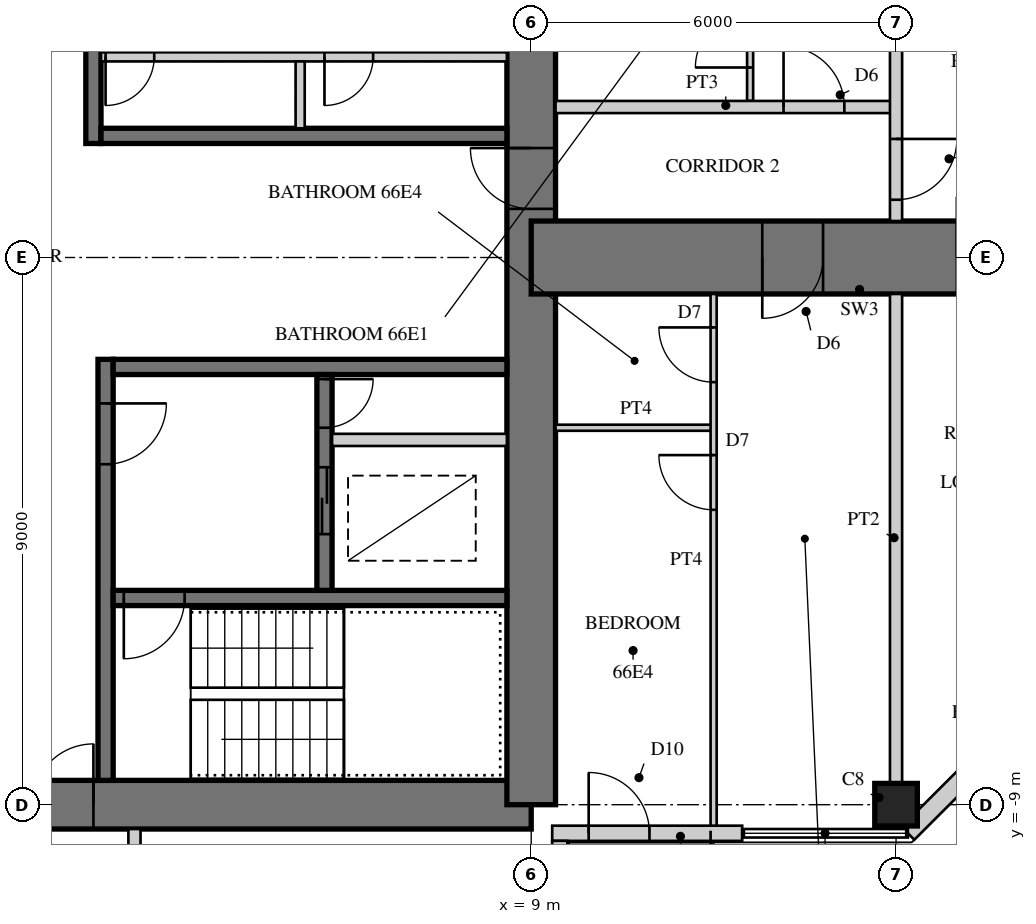
"""IFC4 building model, lengths in metres.
Left out: names, types, materials, properties, quantities, classifications, styles, units other than length and angle.
Written with IfcOpenShell. Run it as: python <this file> out.ifc"""

import sys

from ifc_helpers import new_model, si_unit, direction, frame, frame_2d, origin, origin_2d, place, context, subcontext, project, spatial, rectangle, hollow_rectangle, extrude, element, fill, save


model = new_model("IFC4")
c1 = context("Model", 3, precision=1e-05, world=origin(), true_north=direction((0.0, 1.0)))
c2 = subcontext(c1, "Body", "Model", "MODEL_VIEW")
j1 = project(units=[si_unit("LENGTHUNIT", "METRE"), si_unit("PLANEANGLEUNIT", "RADIAN")], contexts=[c1])
p1 = place(None, origin())
s1 = spatial("IfcSite", under=j1, at=p1, CompositionType="ELEMENT")
p2 = place(p1, origin())
s2 = spatial("IfcBuilding", under=s1, at=p2, CompositionType="ELEMENT")
p3 = place(p2, frame((0.0, 0.0, 257.7)))
s3 = spatial("IfcBuildingStorey", under=s2, at=p3, CompositionType="ELEMENT", Elevation=257.7)
p4 = place(p3, frame((-9.0, -9.0, 0.0), z_axis=(0.0, 0.0, 1.0), x_axis=(1.0, 0.0, 0.0)))
e1 = element("IfcWall", 1, at=p4, inside=s3, PredefinedType="SHEAR", context=c2, shape_type="SweptSolid", body=[
    extrude(rectangle(XDim=18.0, YDim=0.8, at=frame_2d((9.0, 0.0))), origin(), (0.0, 0.0, 1.0), 3.4),
])
p5 = place(p4, frame((9.8, 0.0, 0.0)))
e2 = element("IfcOpeningElement", 2, at=p5, cuts=e1, PredefinedType="OPENING", context=c2, shape_type="SweptSolid", body=[
    extrude(rectangle(XDim=1.0, YDim=2.4, at=frame_2d((0.5, 1.2))), frame((0.0, 0.41, 0.0), z_axis=(0.0, -1.0, 0.0), x_axis=(1.0, 0.0, 0.0)), (0.0, 0.0, 1.0), 0.82),
])
p6 = place(p3, frame((9.0, -9.0, 0.0), z_axis=(0.0, 0.0, 1.0), x_axis=(0.0, 1.0, 0.0)))
e3 = element("IfcWall", 3, at=p6, inside=s3, PredefinedType="SHEAR", context=c2, shape_type="SweptSolid", body=[
    extrude(rectangle(XDim=18.0, YDim=0.8, at=frame_2d((9.0, 0.0))), origin(), (0.0, 0.0, 1.0), 3.4),
])
p7 = place(p6, frame((9.8, 0.0, 0.0)))
e4 = element("IfcOpeningElement", 4, at=p7, cuts=e3, PredefinedType="OPENING", context=c2, shape_type="SweptSolid", body=[
    extrude(rectangle(XDim=1.0, YDim=2.4, at=frame_2d((0.5, 1.2))), frame((0.0, 0.41, 0.0), z_axis=(0.0, -1.0, 0.0), x_axis=(1.0, 0.0, 0.0)), (0.0, 0.0, 1.0), 0.82),
])
p8 = place(p3, frame((1.8, 1.875, 0.0), z_axis=(0.0, 0.0, 1.0), x_axis=(0.0, 1.0, 0.0)))
e5 = element("IfcWall", 5, at=p8, inside=s3, PredefinedType="SHEAR", context=c2, shape_type="SweptSolid", body=[
    extrude(rectangle(XDim=6.725, YDim=0.25, at=frame_2d((3.363, 0.0))), origin(), (0.0, 0.0, 1.0), 3.4),
])
p9 = place(p8, frame((1.875, 0.0, 0.0)))
e6 = element("IfcOpeningElement", 6, at=p9, cuts=e5, PredefinedType="OPENING", context=c2, shape_type="SweptSolid", body=[
    extrude(rectangle(XDim=1.6, YDim=2.4, at=frame_2d((0.8, 1.2))), frame((0.0, 0.135, 0.0), z_axis=(0.0, -1.0, 0.0), x_axis=(1.0, 0.0, 0.0)), (0.0, 0.0, 1.0), 0.27),
])
p10 = place(p3, frame((1.925, 2.0, 0.0), z_axis=(0.0, 0.0, 1.0), x_axis=(1.0, 0.0, 0.0)))
e7 = element("IfcWall", 7, at=p10, inside=s3, PredefinedType="SHEAR", context=c2, shape_type="SweptSolid", body=[
    extrude(rectangle(XDim=6.675, YDim=0.25, at=frame_2d((3.337, 0.0))), origin(), (0.0, 0.0, 1.0), 3.4),
])
p11 = place(p3, frame((1.925, 3.3, 0.0), z_axis=(0.0, 0.0, 1.0), x_axis=(1.0, 0.0, 0.0)))
e8 = element("IfcWall", 8, at=p11, inside=s3, PredefinedType="PARTITIONING", context=c2, shape_type="SweptSolid", body=[
    extrude(rectangle(XDim=6.675, YDim=0.15, at=frame_2d((3.337, 0.0))), origin(), (0.0, 0.0, 1.0), 3.4),
])
p12 = place(p11, frame((0.075, 0.0, 0.0)))
e9 = element("IfcOpeningElement", 9, at=p12, cuts=e8, PredefinedType="OPENING", context=c2, shape_type="SweptSolid", body=[
    extrude(rectangle(XDim=0.8, YDim=2.1, at=frame_2d((0.4, 1.05))), frame((0.0, 0.085, 0.0), z_axis=(0.0, -1.0, 0.0), x_axis=(1.0, 0.0, 0.0)), (0.0, 0.0, 1.0), 0.17),
])
p13 = place(p11, frame((3.675, 0.0, 0.0)))
e10 = element("IfcOpeningElement", 10, at=p13, cuts=e8, PredefinedType="OPENING", context=c2, shape_type="SweptSolid", body=[
    extrude(rectangle(XDim=0.8, YDim=2.1, at=frame_2d((0.4, 1.05))), frame((0.0, 0.085, 0.0), z_axis=(0.0, -1.0, 0.0), x_axis=(1.0, 0.0, 0.0)), (0.0, 0.0, 1.0), 0.17),
])
p14 = place(p3, frame((5.2, 2.125, 0.0), z_axis=(0.0, 0.0, 1.0), x_axis=(0.0, 1.0, 0.0)))
e11 = element("IfcWall", 11, at=p14, inside=s3, PredefinedType="PARTITIONING", context=c2, shape_type="SweptSolid", body=[
    extrude(rectangle(XDim=1.1, YDim=0.15, at=frame_2d((0.55, 0.0))), origin(), (0.0, 0.0, 1.0), 3.4),
])
p15 = place(p3, frame((2.0, -1.675, 0.0), z_axis=(0.0, 0.0, 1.0), x_axis=(0.0, -1.0, 0.0)))
e12 = element("IfcWall", 12, at=p15, inside=s3, PredefinedType="SHEAR", context=c2, shape_type="SweptSolid", body=[
    extrude(rectangle(XDim=6.925, YDim=0.25, at=frame_2d((3.462, 0.0))), origin(), (0.0, 0.0, 1.0), 3.4),
])
p16 = place(p15, frame((0.725, 0.0, 0.0)))
e13 = element("IfcOpeningElement", 13, at=p16, cuts=e12, PredefinedType="OPENING", context=c2, shape_type="SweptSolid", body=[
    extrude(rectangle(XDim=1.0, YDim=2.1, at=frame_2d((0.5, 1.05))), frame((0.0, 0.135, 0.0), z_axis=(0.0, -1.0, 0.0), x_axis=(1.0, 0.0, 0.0)), (0.0, 0.0, 1.0), 0.27),
])
p17 = place(p3, frame((2.125, -1.8, 0.0), z_axis=(0.0, 0.0, 1.0), x_axis=(1.0, 0.0, 0.0)))
e14 = element("IfcWall", 14, at=p17, inside=s3, PredefinedType="SHEAR", context=c2, shape_type="SweptSolid", body=[
    extrude(rectangle(XDim=6.475, YDim=0.25, at=frame_2d((3.238, 0.0))), origin(), (0.0, 0.0, 1.0), 3.4),
])
p18 = place(p3, frame((2.125, -5.6, 0.0), z_axis=(0.0, 0.0, 1.0), x_axis=(1.0, 0.0, 0.0)))
e15 = element("IfcWall", 15, at=p18, inside=s3, PredefinedType="SHEAR", context=c2, shape_type="SweptSolid", body=[
    extrude(rectangle(XDim=6.475, YDim=0.25, at=frame_2d((3.238, 0.0))), origin(), (0.0, 0.0, 1.0), 3.4),
])
p19 = place(p18, frame((0.175, 0.0, 0.0)))
e16 = element("IfcOpeningElement", 16, at=p19, cuts=e15, PredefinedType="OPENING", context=c2, shape_type="SweptSolid", body=[
    extrude(rectangle(XDim=1.0, YDim=2.1, at=frame_2d((0.5, 1.05))), frame((0.0, 0.135, 0.0), z_axis=(0.0, -1.0, 0.0), x_axis=(1.0, 0.0, 0.0)), (0.0, 0.0, 1.0), 0.27),
])
p20 = place(p3, frame((5.6, -1.925, 0.0), z_axis=(0.0, 0.0, 1.0), x_axis=(0.0, -1.0, 0.0)))
e17 = element("IfcWall", 17, at=p20, inside=s3, PredefinedType="SHEAR", context=c2, shape_type="SweptSolid", body=[
    extrude(rectangle(XDim=3.55, YDim=0.25, at=frame_2d((1.775, 0.0))), origin(), (0.0, 0.0, 1.0), 3.4),
])
p21 = place(p20, frame((1.525, 0.0, 0.0)))
e18 = element("IfcOpeningElement", 18, at=p21, cuts=e17, PredefinedType="OPENING", context=c2, shape_type="SweptSolid", body=[
    extrude(rectangle(XDim=1.1, YDim=2.2, at=frame_2d((0.55, 1.1))), frame((0.0, 0.135, 0.0), z_axis=(0.0, -1.0, 0.0), x_axis=(1.0, 0.0, 0.0)), (0.0, 0.0, 1.0), 0.27),
])
p22 = place(p20, frame((0.075, 0.0, 0.0)))
e19 = element("IfcOpeningElement", 19, at=p22, cuts=e17, PredefinedType="OPENING", context=c2, shape_type="SweptSolid", body=[
    extrude(rectangle(XDim=0.8, YDim=2.1, at=frame_2d((0.4, 1.05))), frame((0.0, 0.135, 0.0), z_axis=(0.0, -1.0, 0.0), x_axis=(1.0, 0.0, 0.0)), (0.0, 0.0, 1.0), 0.27),
])
p23 = place(p3, frame((5.725, -3.0, 0.0), z_axis=(0.0, 0.0, 1.0), x_axis=(1.0, 0.0, 0.0)))
e20 = element("IfcWall", 20, at=p23, inside=s3, PredefinedType="PARTITIONING", context=c2, shape_type="SweptSolid", body=[
    extrude(rectangle(XDim=2.875, YDim=0.2, at=frame_2d((1.438, 0.0))), origin(), (0.0, 0.0, 1.0), 3.4),
])
p24 = place(p3, frame((9.0, 0.0, 0.0), z_axis=(0.0, 0.0, 1.0), x_axis=(1.0, 0.0, 0.0)))
e21 = element("IfcWall", 21, at=p24, inside=s3, PredefinedType="SHEAR", context=c2, shape_type="SweptSolid", body=[
    extrude(rectangle(XDim=9.0, YDim=1.2, at=frame_2d((4.5, 0.0))), origin(), (0.0, 0.0, 1.0), 3.4),
])
p25 = place(p24, frame((3.8, 0.0, 0.0)))
e22 = element("IfcOpeningElement", 22, at=p25, cuts=e21, PredefinedType="OPENING", context=c2, shape_type="SweptSolid", body=[
    extrude(rectangle(XDim=1.0, YDim=2.15, at=frame_2d((0.5, 1.075))), frame((0.0, 0.61, 0.0), z_axis=(0.0, -1.0, 0.0), x_axis=(1.0, 0.0, 0.0)), (0.0, 0.0, 1.0), 1.22),
])
p26 = place(p24, frame((7.0, 0.0, 0.0)))
e23 = element("IfcOpeningElement", 23, at=p26, cuts=e21, PredefinedType="OPENING", context=c2, shape_type="SweptSolid", body=[
    extrude(rectangle(XDim=1.0, YDim=2.2, at=frame_2d((0.5, 1.1))), frame((0.0, 0.61, 0.0), z_axis=(0.0, -1.0, 0.0), x_axis=(1.0, 0.0, 0.0)), (0.0, 0.0, 1.0), 1.22),
])
p27 = place(p3, frame((15.0, -9.0, 0.0), z_axis=(0.0, 0.0, 1.0), x_axis=(1.0, 0.0, 0.0)))
e24 = element("IfcColumn", 24, at=p27, inside=s3, PredefinedType="COLUMN", context=c2, shape_type="SweptSolid", body=[
    extrude(rectangle(XDim=0.7, YDim=0.7, at=origin_2d()), origin(), (0.0, 0.0, 1.0), 3.4),
])
p28 = place(p3, frame((9.345, -9.47, 0.0), z_axis=(0.0, 0.0, 1.0), x_axis=(1.0, 0.0, 0.0)))
e25 = element("IfcWall", 25, at=p28, inside=s3, PredefinedType="SOLIDWALL", context=c2, shape_type="SweptSolid", body=[
    extrude(rectangle(XDim=3.125, YDim=0.25, at=frame_2d((1.562, 0.0))), origin(), (0.0, 0.0, 1.0), 3.22),
])
p29 = place(p28, frame((0.6, 0.0, 0.0)))
e26 = element("IfcOpeningElement", 26, at=p29, cuts=e25, PredefinedType="OPENING", context=c2, shape_type="SweptSolid", body=[
    extrude(rectangle(XDim=1.0, YDim=2.2, at=frame_2d((0.5, 1.1))), frame((0.0, 0.135, 0.0), z_axis=(0.0, -1.0, 0.0), x_axis=(1.0, 0.0, 0.0)), (0.0, 0.0, 1.0), 0.27),
])
p30 = place(p3, frame((15.195, -9.47, 0.0), z_axis=(0.0, 0.0, 1.0), x_axis=(0.707106781187, 0.707106781187, 0.0)))
e27 = element("IfcWall", 27, at=p30, inside=s3, PredefinedType="SOLIDWALL", context=c2, shape_type="SweptSolid", body=[
    extrude(rectangle(XDim=4.632, YDim=0.3, at=frame_2d((2.316, 0.0))), origin(), (0.0, 0.0, 1.0), 3.22),
])
p31 = place(p30, frame((1.866, 0.0, 0.3)))
e28 = element("IfcOpeningElement", 28, at=p31, cuts=e27, PredefinedType="OPENING", context=c2, shape_type="SweptSolid", body=[
    extrude(rectangle(XDim=0.9, YDim=2.4, at=frame_2d((0.45, 1.2))), frame((0.0, 0.16, 0.0), z_axis=(0.0, -1.0, 0.0), x_axis=(1.0, 0.0, 0.0)), (0.0, 0.0, 1.0), 0.32),
])
p32 = place(p3, frame((9.47, -12.47, 0.0), z_axis=(0.0, 0.0, 1.0), x_axis=(0.0, 1.0, 0.0)))
e29 = element("IfcWall", 29, at=p32, inside=s3, PredefinedType="SOLIDWALL", context=c2, shape_type="SweptSolid", body=[
    extrude(rectangle(XDim=2.875, YDim=0.25, at=frame_2d((1.438, 0.0))), origin(), (0.0, 0.0, 1.0), 3.22),
])
p33 = place(p32, frame((0.6, 0.0, 0.0)))
e30 = element("IfcOpeningElement", 30, at=p33, cuts=e29, PredefinedType="OPENING", context=c2, shape_type="SweptSolid", body=[
    extrude(rectangle(XDim=1.0, YDim=2.2, at=frame_2d((0.5, 1.1))), frame((0.0, 0.135, 0.0), z_axis=(0.0, -1.0, 0.0), x_axis=(1.0, 0.0, 0.0)), (0.0, 0.0, 1.0), 0.27),
])
p34 = place(p3, frame((12.6, 2.575, 0.0), z_axis=(0.0, 0.0, 1.0), x_axis=(0.0, 1.0, 0.0)))
e31 = element("IfcWall", 31, at=p34, inside=s3, PredefinedType="PARTITIONING", context=c2, shape_type="SweptSolid", body=[
    extrude(rectangle(XDim=6.855, YDim=0.1, at=frame_2d((3.427, 0.0))), origin(), (0.0, 0.0, 1.0), 3.22),
])
p35 = place(p34, frame((0.55, 0.0, 0.0)))
e32 = element("IfcOpeningElement", 32, at=p35, cuts=e31, PredefinedType="OPENING", context=c2, shape_type="SweptSolid", body=[
    extrude(rectangle(XDim=0.9, YDim=2.1, at=frame_2d((0.45, 1.05))), frame((0.0, 0.06, 0.0), z_axis=(0.0, -1.0, 0.0), x_axis=(1.0, 0.0, 0.0)), (0.0, 0.0, 1.0), 0.12),
])
p36 = place(p34, frame((2.65, 0.0, 0.0)))
e33 = element("IfcOpeningElement", 33, at=p36, cuts=e31, PredefinedType="OPENING", context=c2, shape_type="SweptSolid", body=[
    extrude(rectangle(XDim=0.9, YDim=2.1, at=frame_2d((0.45, 1.05))), frame((0.0, 0.06, 0.0), z_axis=(0.0, -1.0, 0.0), x_axis=(1.0, 0.0, 0.0)), (0.0, 0.0, 1.0), 0.12),
])
p37 = place(p3, frame((9.4, -2.8, 0.0), z_axis=(0.0, 0.0, 1.0), x_axis=(1.0, 0.0, 0.0)))
e34 = element("IfcWall", 34, at=p37, inside=s3, PredefinedType="PARTITIONING", context=c2, shape_type="SweptSolid", body=[
    extrude(rectangle(XDim=2.65, YDim=0.1, at=frame_2d((1.325, 0.0))), origin(), (0.0, 0.0, 1.0), 3.22),
])
p38 = place(p3, frame((12.0, -9.345, 0.0), z_axis=(0.0, 0.0, 1.0), x_axis=(0.0, 1.0, 0.0)))
e35 = element("IfcWall", 35, at=p38, inside=s3, PredefinedType="PARTITIONING", context=c2, shape_type="SweptSolid", body=[
    extrude(rectangle(XDim=8.745, YDim=0.1, at=frame_2d((4.373, 0.0))), origin(), (0.0, 0.0, 1.0), 3.22),
])
p39 = place(p38, frame((5.195, 0.0, 0.0)))
e36 = element("IfcOpeningElement", 36, at=p39, cuts=e35, PredefinedType="OPENING", context=c2, shape_type="SweptSolid", body=[
    extrude(rectangle(XDim=0.9, YDim=2.1, at=frame_2d((0.45, 1.05))), frame((0.0, 0.06, 0.0), z_axis=(0.0, -1.0, 0.0), x_axis=(1.0, 0.0, 0.0)), (0.0, 0.0, 1.0), 0.12),
])
p40 = place(p38, frame((7.295, 0.0, 0.0)))
e37 = element("IfcOpeningElement", 37, at=p40, cuts=e35, PredefinedType="OPENING", context=c2, shape_type="SweptSolid", body=[
    extrude(rectangle(XDim=0.9, YDim=2.1, at=frame_2d((0.45, 1.05))), frame((0.0, 0.06, 0.0), z_axis=(0.0, -1.0, 0.0), x_axis=(1.0, 0.0, 0.0)), (0.0, 0.0, 1.0), 0.12),
])
p41 = place(p3, frame((9.4, 2.475, 0.0), z_axis=(0.0, 0.0, 1.0), x_axis=(1.0, 0.0, 0.0)))
e38 = element("IfcWall", 38, at=p41, inside=s3, PredefinedType="SOLIDWALL", context=c2, shape_type="SweptSolid", body=[
    extrude(rectangle(XDim=5.6, YDim=0.2, at=frame_2d((2.8, 0.0))), origin(), (0.0, 0.0, 1.0), 3.22),
])
p42 = place(p41, frame((3.75, 0.0, 0.0)))
e39 = element("IfcOpeningElement", 39, at=p42, cuts=e38, PredefinedType="OPENING", context=c2, shape_type="SweptSolid", body=[
    extrude(rectangle(XDim=1.0, YDim=2.15, at=frame_2d((0.5, 1.075))), frame((0.0, 0.11, 0.0), z_axis=(0.0, -1.0, 0.0), x_axis=(1.0, 0.0, 0.0)), (0.0, 0.0, 1.0), 0.22),
])
p43 = place(p3, frame((15.0, -8.65, 0.0), z_axis=(0.0, 0.0, 1.0), x_axis=(0.0, 1.0, 0.0)))
e40 = element("IfcWall", 40, at=p43, inside=s3, PredefinedType="SOLIDWALL", context=c2, shape_type="SweptSolid", body=[
    extrude(rectangle(XDim=8.05, YDim=0.2, at=frame_2d((4.025, 0.0))), origin(), (0.0, 0.0, 1.0), 2.52),
])
p44 = place(p3, frame((15.0, 0.6, 0.0), z_axis=(0.0, 0.0, 1.0), x_axis=(0.0, 1.0, 0.0)))
e41 = element("IfcWall", 41, at=p44, inside=s3, PredefinedType="SOLIDWALL", context=c2, shape_type="SweptSolid", body=[
    extrude(rectangle(XDim=8.05, YDim=0.2, at=frame_2d((4.025, 0.0))), origin(), (0.0, 0.0, 1.0), 2.52),
])
p45 = place(p44, frame((0.35, 0.0, 0.0)))
e42 = element("IfcOpeningElement", 42, at=p45, cuts=e41, PredefinedType="OPENING", context=c2, shape_type="SweptSolid", body=[
    extrude(rectangle(XDim=1.0, YDim=2.2, at=frame_2d((0.5, 1.1))), frame((0.0, 0.11, 0.0), z_axis=(0.0, -1.0, 0.0), x_axis=(1.0, 0.0, 0.0)), (0.0, 0.0, 1.0), 0.22),
])
p46 = place(p3, frame((2.475, -9.4, 0.0), z_axis=(0.0, 0.0, 1.0), x_axis=(0.0, -1.0, 0.0)))
e43 = element("IfcWall", 43, at=p46, inside=s3, PredefinedType="SOLIDWALL", context=c2, shape_type="SweptSolid", body=[
    extrude(rectangle(XDim=5.6, YDim=0.2, at=frame_2d((2.8, 0.0))), origin(), (0.0, 0.0, 1.0), 3.22),
])
p47 = place(p46, frame((1.2, 0.0, 0.0)))
e44 = element("IfcOpeningElement", 44, at=p47, cuts=e43, PredefinedType="OPENING", context=c2, shape_type="SweptSolid", body=[
    extrude(rectangle(XDim=1.0, YDim=2.2, at=frame_2d((0.5, 1.1))), frame((0.0, 0.11, 0.0), z_axis=(0.0, -1.0, 0.0), x_axis=(1.0, 0.0, 0.0)), (0.0, 0.0, 1.0), 0.22),
])
p48 = place(p29, origin())
e45 = element("IfcDoor", 45, at=p48, inside=s3, OperationType="SINGLE_SWING_LEFT", PredefinedType="DOOR", context=c2, shape_type="SweptSolid", body=[
    extrude(hollow_rectangle(XDim=1.0, YDim=2.2, WallThickness=0.06, at=frame_2d((0.5, 1.1))), frame((0.0, 0.025, 0.0), z_axis=(0.0, -1.0, 0.0), x_axis=(1.0, 0.0, 0.0)), (0.0, 0.0, 1.0), 0.05),
    extrude(rectangle(XDim=0.879, YDim=2.079, at=frame_2d((0.5, 1.1))), frame((0.0, 0.025, 0.0), z_axis=(0.0, -1.0, 0.0), x_axis=(1.0, 0.0, 0.0)), (0.0, 0.0, 1.0), 0.05),
])
fill(e26, e45)
p49 = place(p35, origin())
e46 = element("IfcDoor", 46, at=p49, inside=s3, OperationType="SINGLE_SWING_LEFT", PredefinedType="DOOR", context=c2, shape_type="SweptSolid", body=[
    extrude(rectangle(XDim=0.9, YDim=2.1, at=frame_2d((0.45, 1.05))), frame((0.0, 0.025, 0.0), z_axis=(0.0, -1.0, 0.0), x_axis=(1.0, 0.0, 0.0)), (0.0, 0.0, 1.0), 0.05),
])
fill(e32, e46)
p50 = place(p39, origin())
e47 = element("IfcDoor", 47, at=p50, inside=s3, OperationType="SINGLE_SWING_RIGHT", PredefinedType="DOOR", context=c2, shape_type="SweptSolid", body=[
    extrude(rectangle(XDim=0.9, YDim=2.1, at=frame_2d((0.45, 1.05))), frame((0.0, 0.025, 0.0), z_axis=(0.0, -1.0, 0.0), x_axis=(1.0, 0.0, 0.0)), (0.0, 0.0, 1.0), 0.05),
])
fill(e36, e47)
p51 = place(p40, origin())
e48 = element("IfcDoor", 48, at=p51, inside=s3, OperationType="SINGLE_SWING_RIGHT", PredefinedType="DOOR", context=c2, shape_type="SweptSolid", body=[
    extrude(rectangle(XDim=0.9, YDim=2.1, at=frame_2d((0.45, 1.05))), frame((0.0, 0.025, 0.0), z_axis=(0.0, -1.0, 0.0), x_axis=(1.0, 0.0, 0.0)), (0.0, 0.0, 1.0), 0.05),
])
fill(e37, e48)
p52 = place(p42, origin())
e49 = element("IfcDoor", 49, at=p52, inside=s3, OperationType="SINGLE_SWING_LEFT", PredefinedType="DOOR", context=c2, shape_type="SweptSolid", body=[
    extrude(rectangle(XDim=1.0, YDim=2.15, at=frame_2d((0.5, 1.075))), frame((0.0, 0.025, 0.0), z_axis=(0.0, -1.0, 0.0), x_axis=(1.0, 0.0, 0.0)), (0.0, 0.0, 1.0), 0.05),
])
fill(e39, e49)
p53 = place(p45, frame((1.0, 0.0, 0.0), z_axis=(0.0, 0.0, 1.0), x_axis=(-1.0, 0.0, 0.0)))
e50 = element("IfcDoor", 50, at=p53, inside=s3, OperationType="SINGLE_SWING_LEFT", PredefinedType="DOOR", context=c2, shape_type="SweptSolid", body=[
    extrude(rectangle(XDim=1.0, YDim=2.2, at=frame_2d((0.5, 1.1))), frame((0.0, 0.025, 0.0), z_axis=(0.0, -1.0, 0.0), x_axis=(1.0, 0.0, 0.0)), (0.0, 0.0, 1.0), 0.05),
])
fill(e42, e50)
p54 = place(p25, frame((1.0, 0.0, 0.0), z_axis=(0.0, 0.0, 1.0), x_axis=(-1.0, 0.0, 0.0)))
e51 = element("IfcDoor", 51, at=p54, inside=s3, OperationType="SINGLE_SWING_RIGHT", PredefinedType="DOOR", context=c2, shape_type="SweptSolid", body=[
    extrude(rectangle(XDim=1.0, YDim=2.15, at=frame_2d((0.5, 1.075))), frame((0.0, 0.025, 0.0), z_axis=(0.0, -1.0, 0.0), x_axis=(1.0, 0.0, 0.0)), (0.0, 0.0, 1.0), 0.05),
])
fill(e22, e51)
p55 = place(p5, origin())
e52 = element("IfcDoor", 52, at=p55, inside=s3, OperationType="SINGLE_SWING_RIGHT", PredefinedType="DOOR", context=c2, shape_type="SweptSolid", body=[
    extrude(rectangle(XDim=1.0, YDim=2.4, at=frame_2d((0.5, 1.2))), frame((0.0, 0.055, 0.0), z_axis=(0.0, -1.0, 0.0), x_axis=(1.0, 0.0, 0.0)), (0.0, 0.0, 1.0), 0.05),
])
fill(e2, e52)
p56 = place(p7, origin())
e53 = element("IfcDoor", 53, at=p56, inside=s3, OperationType="SINGLE_SWING_RIGHT", PredefinedType="DOOR", context=c2, shape_type="SweptSolid", body=[
    extrude(rectangle(XDim=1.0, YDim=2.4, at=frame_2d((0.5, 1.2))), frame((0.0, 0.055, 0.0), z_axis=(0.0, -1.0, 0.0), x_axis=(1.0, 0.0, 0.0)), (0.0, 0.0, 1.0), 0.05),
])
fill(e4, e53)
p57 = place(p12, frame((0.8, 0.0, 0.0), z_axis=(0.0, 0.0, 1.0), x_axis=(-1.0, 0.0, 0.0)))
e54 = element("IfcDoor", 54, at=p57, inside=s3, OperationType="SINGLE_SWING_RIGHT", PredefinedType="DOOR", context=c2, shape_type="SweptSolid", body=[
    extrude(rectangle(XDim=0.8, YDim=2.1, at=frame_2d((0.4, 1.05))), frame((0.0, 0.025, 0.0), z_axis=(0.0, -1.0, 0.0), x_axis=(1.0, 0.0, 0.0)), (0.0, 0.0, 1.0), 0.05),
])
fill(e9, e54)
p58 = place(p13, frame((0.8, 0.0, 0.0), z_axis=(0.0, 0.0, 1.0), x_axis=(-1.0, 0.0, 0.0)))
e55 = element("IfcDoor", 55, at=p58, inside=s3, OperationType="SINGLE_SWING_RIGHT", PredefinedType="DOOR", context=c2, shape_type="SweptSolid", body=[
    extrude(rectangle(XDim=0.8, YDim=2.1, at=frame_2d((0.4, 1.05))), frame((0.0, 0.025, 0.0), z_axis=(0.0, -1.0, 0.0), x_axis=(1.0, 0.0, 0.0)), (0.0, 0.0, 1.0), 0.05),
])
fill(e10, e55)
p59 = place(p16, origin())
e56 = element("IfcDoor", 56, at=p59, inside=s3, OperationType="SINGLE_SWING_LEFT", PredefinedType="DOOR", context=c2, shape_type="SweptSolid", body=[
    extrude(rectangle(XDim=1.0, YDim=2.1, at=frame_2d((0.5, 1.05))), frame((0.0, 0.025, 0.0), z_axis=(0.0, -1.0, 0.0), x_axis=(1.0, 0.0, 0.0)), (0.0, 0.0, 1.0), 0.05),
])
fill(e13, e56)
p60 = place(p19, frame((1.0, 0.0, 0.0), z_axis=(0.0, 0.0, 1.0), x_axis=(-1.0, 0.0, 0.0)))
e57 = element("IfcDoor", 57, at=p60, inside=s3, OperationType="SINGLE_SWING_RIGHT", PredefinedType="DOOR", context=c2, shape_type="SweptSolid", body=[
    extrude(rectangle(XDim=1.0, YDim=2.1, at=frame_2d((0.5, 1.05))), frame((0.0, 0.025, 0.0), z_axis=(0.0, -1.0, 0.0), x_axis=(1.0, 0.0, 0.0)), (0.0, 0.0, 1.0), 0.05),
])
fill(e16, e57)
p61 = place(p21, origin())
e58 = element("IfcDoor", 58, at=p61, inside=s3, OperationType="DOUBLE_DOOR_SLIDING", PredefinedType="DOOR", context=c2, shape_type="SweptSolid", body=[
    extrude(rectangle(XDim=1.1, YDim=2.2, at=frame_2d((0.55, 1.1))), frame((0.0, 0.025, 0.0), z_axis=(0.0, -1.0, 0.0), x_axis=(1.0, 0.0, 0.0)), (0.0, 0.0, 1.0), 0.05),
])
fill(e18, e58)
p62 = place(p22, origin())
e59 = element("IfcDoor", 59, at=p62, inside=s3, OperationType="SINGLE_SWING_LEFT", PredefinedType="DOOR", context=c2, shape_type="SweptSolid", body=[
    extrude(rectangle(XDim=0.8, YDim=2.1, at=frame_2d((0.4, 1.05))), frame((0.0, 0.025, 0.0), z_axis=(0.0, -1.0, 0.0), x_axis=(1.0, 0.0, 0.0)), (0.0, 0.0, 1.0), 0.05),
])
fill(e19, e59)
save(model, sys.argv[1])
